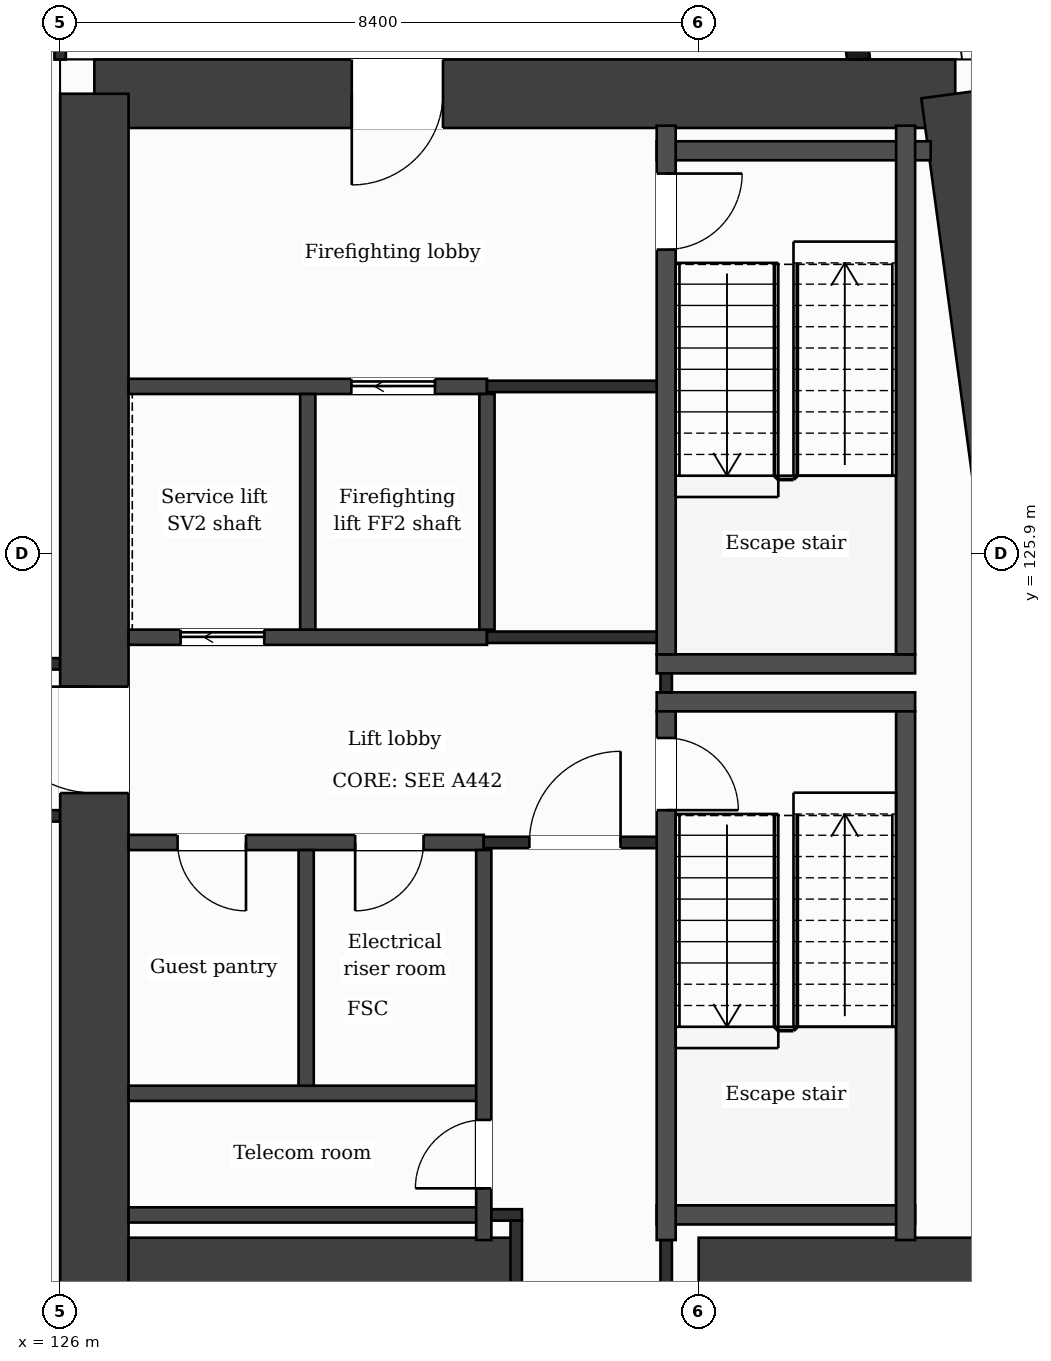
"""IFC4 building model, lengths in metres.
Left out: names, types, materials, properties, quantities, classifications, styles, units other than length and angle.
Written with IfcOpenShell. Run it as: python <this file> out.ifc"""

import sys

from ifc_helpers import new_model, si_unit, direction, frame, frame_2d, origin, place, context, subcontext, project, spatial, rectangle, extrude, element, fill, save


model = new_model("IFC4")
c1 = context("Model", 3, precision=1e-05, world=origin(), true_north=direction((0.0, 1.0)))
c2 = subcontext(c1, "Body", "Model", "MODEL_VIEW")
j1 = project(units=[si_unit("LENGTHUNIT", "METRE"), si_unit("PLANEANGLEUNIT", "RADIAN")], contexts=[c1])
p1 = place(None, origin())
s1 = spatial("IfcSite", under=j1, at=p1, CompositionType="ELEMENT")
p2 = place(p1, origin())
s2 = spatial("IfcBuilding", under=s1, at=p2, CompositionType="ELEMENT")
p3 = place(p2, frame((0.0, 0.0, 173.7)))
s3 = spatial("IfcBuildingStorey", under=s2, at=p3, CompositionType="ELEMENT", Elevation=173.7)
p4 = place(p3, frame((126.45, 131.95, 0.0), z_axis=(0.0, 0.0, 1.0), x_axis=(1.0, 0.0, 0.0)))
e1 = element("IfcWall", 1, at=p4, inside=s3, PredefinedType="SHEAR", context=c2, shape_type="SweptSolid", body=[
    extrude(rectangle(XDim=11.326, YDim=0.9, at=frame_2d((5.663, 0.0))), origin(), (0.0, 0.0, 1.0), 3.7),
])
p5 = place(p4, frame((3.386, 0.0, 0.0)))
e2 = element("IfcOpeningElement", 2, at=p5, cuts=e1, PredefinedType="OPENING", context=c2, shape_type="SweptSolid", body=[
    extrude(rectangle(XDim=1.2, YDim=2.1, at=frame_2d((0.6, 1.05))), frame((0.0, 0.46, 0.0), z_axis=(0.0, -1.0, 0.0), x_axis=(1.0, 0.0, 0.0)), (0.0, 0.0, 1.0), 0.92),
])
p6 = place(p3, frame((137.776, 131.95, 0.0), z_axis=(0.0, 0.0, 1.0), x_axis=(0.133421759112, -0.991059349482, 0.0)))
e3 = element("IfcWall", 3, at=p6, inside=s3, PredefinedType="SHEAR", context=c2, shape_type="SweptSolid", body=[
    extrude(rectangle(XDim=21.29, YDim=0.9, at=frame_2d((10.645, 0.0))), origin(), (0.0, 0.0, 1.0), 3.7),
])
p7 = place(p3, frame((126.45, 110.85, 0.0), z_axis=(0.0, 0.0, 1.0), x_axis=(0.0, 1.0, 0.0)))
e4 = element("IfcWall", 4, at=p7, inside=s3, PredefinedType="SHEAR", context=c2, shape_type="SweptSolid", body=[
    extrude(rectangle(XDim=21.1, YDim=0.9, at=frame_2d((10.55, 0.0))), origin(), (0.0, 0.0, 1.0), 3.7),
])
p8 = place(p7, frame((11.9, 0.0, 0.0)))
e5 = element("IfcOpeningElement", 5, at=p8, cuts=e4, PredefinedType="OPENING", context=c2, shape_type="SweptSolid", body=[
    extrude(rectangle(XDim=1.4, YDim=2.1, at=frame_2d((0.7, 1.05))), frame((0.0, 0.46, 0.0), z_axis=(0.0, -1.0, 0.0), x_axis=(1.0, 0.0, 0.0)), (0.0, 0.0, 1.0), 0.92),
])
p9 = place(p3, frame((126.9, 116.45, 0.0), z_axis=(0.0, 0.0, 1.0), x_axis=(1.0, 0.0, 0.0)))
e6 = element("IfcWall", 6, at=p9, inside=s3, PredefinedType="SHEAR", context=c2, shape_type="SweptSolid", body=[
    extrude(rectangle(XDim=5.1, YDim=0.9, at=frame_2d((2.55, 0.0))), origin(), (0.0, 0.0, 1.0), 3.7),
])
p10 = place(p3, frame((134.4, 116.45, 0.0), z_axis=(0.0, 0.0, 1.0), x_axis=(1.0, 0.0, 0.0)))
e7 = element("IfcWall", 7, at=p10, inside=s3, PredefinedType="SHEAR", context=c2, shape_type="SweptSolid", body=[
    extrude(rectangle(XDim=5.077, YDim=0.9, at=frame_2d((2.539, 0.0))), origin(), (0.0, 0.0, 1.0), 3.7),
])
p11 = place(p3, frame((136.504, 132.4, 0.0), z_axis=(0.0, 0.0, 1.0), x_axis=(-0.133399697462, 0.99106231929, 0.0)))
e8 = element("IfcWall", 8, at=p11, inside=s3, PredefinedType="SOLIDWALL", context=c2, shape_type="SweptSolid", body=[
    extrude(rectangle(XDim=6.74, YDim=0.3, at=frame_2d((3.37, 0.0))), origin(), (0.0, 0.0, 1.0), 3.38),
])
p12 = place(p11, frame((1.115, 0.0, 0.0)))
e9 = element("IfcOpeningElement", 9, at=p12, cuts=e8, PredefinedType="OPENING", context=c2, shape_type="SweptSolid", body=[
    extrude(rectangle(XDim=1.2, YDim=2.4, at=frame_2d((0.6, 1.2))), frame((0.0, 0.16, 0.0), z_axis=(0.0, -1.0, 0.0), x_axis=(1.0, 0.0, 0.0)), (0.0, 0.0, 1.0), 0.32),
])
p13 = place(p11, frame((4.436, 0.0, 0.9)))
e10 = element("IfcOpeningElement", 10, at=p13, cuts=e8, PredefinedType="OPENING", context=c2, shape_type="SweptSolid", body=[
    extrude(rectangle(XDim=1.2, YDim=2.1, at=frame_2d((0.6, 1.05))), frame((0.0, 0.16, 0.0), z_axis=(0.0, -1.0, 0.0), x_axis=(1.0, 0.0, 0.0)), (0.0, 0.0, 1.0), 0.32),
])
p14 = place(p3, frame((126.9, 117.2, 0.0), z_axis=(0.0, 0.0, 1.0), x_axis=(1.0, 0.0, 0.0)))
e11 = element("IfcWall", 11, at=p14, inside=s3, PredefinedType="PARTITIONING", context=c2, shape_type="SweptSolid", body=[
    extrude(rectangle(XDim=4.673, YDim=0.2, at=frame_2d((2.336, 0.0))), origin(), (0.0, 0.0, 1.0), 3.38),
])
p15 = place(p3, frame((131.573, 117.2, 0.0), z_axis=(0.0, 0.0, 1.0), x_axis=(1.0, 0.0, 0.0)))
e12 = element("IfcWall", 12, at=p15, inside=s3, PredefinedType="PARTITIONING", context=c2, shape_type="SweptSolid", body=[
    extrude(rectangle(XDim=0.502, YDim=0.15, at=frame_2d((0.251, 0.0))), origin(), (0.0, 0.0, 1.0), 3.38),
])
p16 = place(p3, frame((133.848, 117.2, 0.0), z_axis=(0.0, 0.0, 1.0), x_axis=(1.0, 0.0, 0.0)))
e13 = element("IfcWall", 13, at=p16, inside=s3, PredefinedType="PARTITIONING", context=c2, shape_type="SweptSolid", body=[
    extrude(rectangle(XDim=3.4, YDim=0.25, at=frame_2d((1.7, 0.0))), origin(), (0.0, 0.0, 1.0), 3.38),
])
p17 = place(p3, frame((126.9, 118.8, 0.0), z_axis=(0.0, 0.0, 1.0), x_axis=(1.0, 0.0, 0.0)))
e14 = element("IfcWall", 14, at=p17, inside=s3, PredefinedType="PARTITIONING", context=c2, shape_type="SweptSolid", body=[
    extrude(rectangle(XDim=4.673, YDim=0.2, at=frame_2d((2.336, 0.0))), origin(), (0.0, 0.0, 1.0), 3.38),
])
p18 = place(p3, frame((126.9, 122.1, 0.0), z_axis=(0.0, 0.0, 1.0), x_axis=(1.0, 0.0, 0.0)))
e15 = element("IfcWall", 15, at=p18, inside=s3, PredefinedType="PARTITIONING", context=c2, shape_type="SweptSolid", body=[
    extrude(rectangle(XDim=4.673, YDim=0.2, at=frame_2d((2.336, 0.0))), origin(), (0.0, 0.0, 1.0), 3.38),
])
p19 = place(p18, frame((2.981, 0.0, 0.0)))
e16 = element("IfcOpeningElement", 16, at=p19, cuts=e15, PredefinedType="OPENING", context=c2, shape_type="SweptSolid", body=[
    extrude(rectangle(XDim=0.9, YDim=2.1, at=frame_2d((0.45, 1.05))), frame((0.0, 0.11, 0.0), z_axis=(0.0, -1.0, 0.0), x_axis=(1.0, 0.0, 0.0)), (0.0, 0.0, 1.0), 0.22),
])
p20 = place(p18, frame((0.645, 0.0, 0.0)))
e17 = element("IfcOpeningElement", 17, at=p20, cuts=e15, PredefinedType="OPENING", context=c2, shape_type="SweptSolid", body=[
    extrude(rectangle(XDim=0.9, YDim=2.1, at=frame_2d((0.45, 1.05))), frame((0.0, 0.11, 0.0), z_axis=(0.0, -1.0, 0.0), x_axis=(1.0, 0.0, 0.0)), (0.0, 0.0, 1.0), 0.22),
])
p21 = place(p3, frame((131.573, 122.1, 0.0), z_axis=(0.0, 0.0, 1.0), x_axis=(1.0, 0.0, 0.0)))
e18 = element("IfcWall", 18, at=p21, inside=s3, PredefinedType="PARTITIONING", context=c2, shape_type="SweptSolid", body=[
    extrude(rectangle(XDim=2.4, YDim=0.15, at=frame_2d((1.2, 0.0))), origin(), (0.0, 0.0, 1.0), 3.38),
])
p22 = place(p21, frame((0.6, 0.0, 0.0)))
e19 = element("IfcOpeningElement", 19, at=p22, cuts=e18, PredefinedType="OPENING", context=c2, shape_type="SweptSolid", body=[
    extrude(rectangle(XDim=1.2, YDim=2.1, at=frame_2d((0.6, 1.05))), frame((0.0, 0.085, 0.0), z_axis=(0.0, -1.0, 0.0), x_axis=(1.0, 0.0, 0.0)), (0.0, 0.0, 1.0), 0.17),
])
p23 = place(p3, frame((100.8, 122.45, 0.0), z_axis=(0.0, 0.0, 1.0), x_axis=(1.0, 0.0, 0.0)))
e20 = element("IfcWall", 20, at=p23, inside=s3, PredefinedType="PARTITIONING", context=c2, shape_type="SweptSolid", body=[
    extrude(rectangle(XDim=25.2, YDim=0.15, at=frame_2d((12.6, 0.0))), origin(), (0.0, 0.0, 1.0), 3.38),
])
for number, where, z_axis, x_axis in (
    (21, (133.848, 123.95, 0.0), (0.0, 0.0, 1.0), (1.0, 0.0, 0.0)),
    (22, (133.848, 124.45, 0.0), (0.0, 0.0, 1.0), (1.0, 0.0, 0.0)),
):
    element("IfcWall", number, at=place(p3, frame(where, z_axis=z_axis, x_axis=x_axis)), inside=s3, PredefinedType="PARTITIONING", context=c2, shape_type="SweptSolid", body=[
        extrude(rectangle(XDim=3.4, YDim=0.25, at=frame_2d((1.7, 0.0))), origin(), (0.0, 0.0, 1.0), 3.38),
    ])
p24 = place(p3, frame((100.8, 124.45, 0.0), z_axis=(0.0, 0.0, 1.0), x_axis=(1.0, 0.0, 0.0)))
e23 = element("IfcWall", 23, at=p24, inside=s3, PredefinedType="PARTITIONING", context=c2, shape_type="SweptSolid", body=[
    extrude(rectangle(XDim=25.2, YDim=0.15, at=frame_2d((12.6, 0.0))), origin(), (0.0, 0.0, 1.0), 3.38),
])
p25 = place(p24, frame((0.975, 0.0, 0.0)))
e24 = element("IfcOpeningElement", 24, at=p25, cuts=e23, PredefinedType="OPENING", context=c2, shape_type="SweptSolid", body=[
    extrude(rectangle(XDim=1.0, YDim=2.1, at=frame_2d((0.5, 1.05))), frame((0.0, 0.085, 0.0), z_axis=(0.0, -1.0, 0.0), x_axis=(1.0, 0.0, 0.0)), (0.0, 0.0, 1.0), 0.17),
])
p26 = place(p24, frame((6.05, 0.0, 0.0)))
e25 = element("IfcOpeningElement", 25, at=p26, cuts=e23, PredefinedType="OPENING", context=c2, shape_type="SweptSolid", body=[
    extrude(rectangle(XDim=1.0, YDim=2.1, at=frame_2d((0.5, 1.05))), frame((0.0, 0.085, 0.0), z_axis=(0.0, -1.0, 0.0), x_axis=(1.0, 0.0, 0.0)), (0.0, 0.0, 1.0), 0.17),
])
p27 = place(p24, frame((9.27, 0.0, 0.0)))
e26 = element("IfcOpeningElement", 26, at=p27, cuts=e23, PredefinedType="OPENING", context=c2, shape_type="SweptSolid", body=[
    extrude(rectangle(XDim=1.0, YDim=2.1, at=frame_2d((0.5, 1.05))), frame((0.0, 0.085, 0.0), z_axis=(0.0, -1.0, 0.0), x_axis=(1.0, 0.0, 0.0)), (0.0, 0.0, 1.0), 0.17),
])
p28 = place(p24, frame((14.2, 0.0, 0.0)))
e27 = element("IfcOpeningElement", 27, at=p28, cuts=e23, PredefinedType="OPENING", context=c2, shape_type="SweptSolid", body=[
    extrude(rectangle(XDim=1.0, YDim=2.1, at=frame_2d((0.5, 1.05))), frame((0.0, 0.085, 0.0), z_axis=(0.0, -1.0, 0.0), x_axis=(1.0, 0.0, 0.0)), (0.0, 0.0, 1.0), 0.17),
])
p29 = place(p24, frame((18.825, 0.0, 0.0)))
e28 = element("IfcOpeningElement", 28, at=p29, cuts=e23, PredefinedType="OPENING", context=c2, shape_type="SweptSolid", body=[
    extrude(rectangle(XDim=1.0, YDim=2.1, at=frame_2d((0.5, 1.05))), frame((0.0, 0.085, 0.0), z_axis=(0.0, -1.0, 0.0), x_axis=(1.0, 0.0, 0.0)), (0.0, 0.0, 1.0), 0.17),
])
p30 = place(p3, frame((126.9, 124.8, 0.0), z_axis=(0.0, 0.0, 1.0), x_axis=(1.0, 0.0, 0.0)))
e29 = element("IfcWall", 29, at=p30, inside=s3, PredefinedType="PARTITIONING", context=c2, shape_type="SweptSolid", body=[
    extrude(rectangle(XDim=4.715, YDim=0.2, at=frame_2d((2.358, 0.0))), origin(), (0.0, 0.0, 1.0), 3.38),
])
p31 = place(p30, frame((0.685, 0.0, 0.0)))
e30 = element("IfcOpeningElement", 30, at=p31, cuts=e29, PredefinedType="OPENING", context=c2, shape_type="SweptSolid", body=[
    extrude(rectangle(XDim=1.1, YDim=2.1, at=frame_2d((0.55, 1.05))), frame((0.0, 0.11, 0.0), z_axis=(0.0, -1.0, 0.0), x_axis=(1.0, 0.0, 0.0)), (0.0, 0.0, 1.0), 0.22),
])
p32 = place(p3, frame((131.615, 124.8, 0.0), z_axis=(0.0, 0.0, 1.0), x_axis=(1.0, 0.0, 0.0)))
e31 = element("IfcWall", 31, at=p32, inside=s3, PredefinedType="PARTITIONING", context=c2, shape_type="SweptSolid", body=[
    extrude(rectangle(XDim=2.483, YDim=0.15, at=frame_2d((1.241, 0.0))), origin(), (0.0, 0.0, 1.0), 3.38),
])
p33 = place(p3, frame((126.9, 128.1, 0.0), z_axis=(0.0, 0.0, 1.0), x_axis=(1.0, 0.0, 0.0)))
e32 = element("IfcWall", 32, at=p33, inside=s3, PredefinedType="PARTITIONING", context=c2, shape_type="SweptSolid", body=[
    extrude(rectangle(XDim=4.715, YDim=0.2, at=frame_2d((2.358, 0.0))), origin(), (0.0, 0.0, 1.0), 3.38),
])
p34 = place(p33, frame((2.931, 0.0, 0.0)))
e33 = element("IfcOpeningElement", 33, at=p34, cuts=e32, PredefinedType="OPENING", context=c2, shape_type="SweptSolid", body=[
    extrude(rectangle(XDim=1.1, YDim=2.1, at=frame_2d((0.55, 1.05))), frame((0.0, 0.11, 0.0), z_axis=(0.0, -1.0, 0.0), x_axis=(1.0, 0.0, 0.0)), (0.0, 0.0, 1.0), 0.22),
])
p35 = place(p3, frame((131.615, 128.1, 0.0), z_axis=(0.0, 0.0, 1.0), x_axis=(1.0, 0.0, 0.0)))
e34 = element("IfcWall", 34, at=p35, inside=s3, PredefinedType="PARTITIONING", context=c2, shape_type="SweptSolid", body=[
    extrude(rectangle(XDim=2.358, YDim=0.15, at=frame_2d((1.179, 0.0))), origin(), (0.0, 0.0, 1.0), 3.38),
])
p36 = place(p3, frame((133.848, 131.2, 0.0), z_axis=(0.0, 0.0, 1.0), x_axis=(1.0, 0.0, 0.0)))
e35 = element("IfcWall", 35, at=p36, inside=s3, PredefinedType="PARTITIONING", context=c2, shape_type="SweptSolid", body=[
    extrude(rectangle(XDim=3.605, YDim=0.25, at=frame_2d((1.802, 0.0))), origin(), (0.0, 0.0, 1.0), 3.38),
])
p37 = place(p3, frame((126.0, 132.4, 0.0), z_axis=(0.0, 0.0, 1.0), x_axis=(0.0, 1.0, 0.0)))
e36 = element("IfcWall", 36, at=p37, inside=s3, PredefinedType="PARTITIONING", context=c2, shape_type="SweptSolid", body=[
    extrude(rectangle(XDim=1.325, YDim=0.15, at=frame_2d((0.663, 0.0))), origin(), (0.0, 0.0, 1.0), 3.38),
])
for number, where, z_axis, x_axis in (
    (37, (129.237, 118.9, 0.0), (0.0, 0.0, 1.0), (0.0, 1.0, 0.0)),
    (38, (129.258, 124.9, 0.0), (0.0, 0.0, 1.0), (0.0, 1.0, 0.0)),
):
    element("IfcWall", number, at=place(p3, frame(where, z_axis=z_axis, x_axis=x_axis)), inside=s3, PredefinedType="PARTITIONING", context=c2, shape_type="SweptSolid", body=[
        extrude(rectangle(XDim=3.1, YDim=0.2, at=frame_2d((1.55, 0.0))), origin(), (0.0, 0.0, 1.0), 3.38),
    ])
p38 = place(p3, frame((131.573, 116.87, 0.0), z_axis=(0.0, 0.0, 1.0), x_axis=(0.0, 1.0, 0.0)))
e39 = element("IfcWall", 39, at=p38, inside=s3, PredefinedType="PARTITIONING", context=c2, shape_type="SweptSolid", body=[
    extrude(rectangle(XDim=5.13, YDim=0.2, at=frame_2d((2.565, 0.0))), origin(), (0.0, 0.0, 1.0), 3.38),
])
p39 = place(p38, frame((0.68, 0.0, 0.0)))
e40 = element("IfcOpeningElement", 40, at=p39, cuts=e39, PredefinedType="OPENING", context=c2, shape_type="SweptSolid", body=[
    extrude(rectangle(XDim=0.9, YDim=2.1, at=frame_2d((0.45, 1.05))), frame((0.0, 0.11, 0.0), z_axis=(0.0, -1.0, 0.0), x_axis=(1.0, 0.0, 0.0)), (0.0, 0.0, 1.0), 0.22),
])
p40 = place(p3, frame((131.615, 124.9, 0.0), z_axis=(0.0, 0.0, 1.0), x_axis=(0.0, 1.0, 0.0)))
e41 = element("IfcWall", 41, at=p40, inside=s3, PredefinedType="PARTITIONING", context=c2, shape_type="SweptSolid", body=[
    extrude(rectangle(XDim=3.1, YDim=0.2, at=frame_2d((1.55, 0.0))), origin(), (0.0, 0.0, 1.0), 3.38),
])
p41 = place(p3, frame((132.0, 116.0, 0.0), z_axis=(0.0, 0.0, 1.0), x_axis=(0.0, 1.0, 0.0)))
e42 = element("IfcWall", 42, at=p41, inside=s3, PredefinedType="PARTITIONING", context=c2, shape_type="SweptSolid", body=[
    extrude(rectangle(XDim=1.125, YDim=0.15, at=frame_2d((0.562, 0.0))), origin(), (0.0, 0.0, 1.0), 3.38),
])
p42 = place(p3, frame((133.973, 116.0, 0.0), z_axis=(0.0, 0.0, 1.0), x_axis=(0.0, 1.0, 0.0)))
e43 = element("IfcWall", 43, at=p42, inside=s3, PredefinedType="PARTITIONING", context=c2, shape_type="SweptSolid", body=[
    extrude(rectangle(XDim=0.87, YDim=0.15, at=frame_2d((0.435, 0.0))), origin(), (0.0, 0.0, 1.0), 3.38),
])
p43 = place(p3, frame((133.973, 124.075, 0.0), z_axis=(0.0, 0.0, 1.0), x_axis=(0.0, 1.0, 0.0)))
e44 = element("IfcWall", 44, at=p43, inside=s3, PredefinedType="PARTITIONING", context=c2, shape_type="SweptSolid", body=[
    extrude(rectangle(XDim=0.25, YDim=0.15, at=frame_2d((0.125, 0.0))), origin(), (0.0, 0.0, 1.0), 3.38),
])
p44 = place(p3, frame((133.973, 116.87, 0.0), z_axis=(0.0, 0.0, 1.0), x_axis=(0.0, 1.0, 0.0)))
e45 = element("IfcWall", 45, at=p44, inside=s3, PredefinedType="PARTITIONING", context=c2, shape_type="SweptSolid", body=[
    extrude(rectangle(XDim=6.955, YDim=0.25, at=frame_2d((3.478, 0.0))), origin(), (0.0, 0.0, 1.0), 3.38),
])
p45 = place(p44, frame((5.655, 0.0, 0.0)))
e46 = element("IfcOpeningElement", 46, at=p45, cuts=e45, PredefinedType="OPENING", context=c2, shape_type="SweptSolid", body=[
    extrude(rectangle(XDim=0.95, YDim=2.1, at=frame_2d((0.475, 1.05))), frame((0.0, 0.135, 0.0), z_axis=(0.0, -1.0, 0.0), x_axis=(1.0, 0.0, 0.0)), (0.0, 0.0, 1.0), 0.27),
])
p46 = place(p3, frame((133.973, 124.575, 0.0), z_axis=(0.0, 0.0, 1.0), x_axis=(0.0, 1.0, 0.0)))
e47 = element("IfcWall", 47, at=p46, inside=s3, PredefinedType="PARTITIONING", context=c2, shape_type="SweptSolid", body=[
    extrude(rectangle(XDim=6.955, YDim=0.25, at=frame_2d((3.478, 0.0))), origin(), (0.0, 0.0, 1.0), 3.38),
])
p47 = place(p46, frame((5.325, 0.0, 0.0)))
e48 = element("IfcOpeningElement", 48, at=p47, cuts=e47, PredefinedType="OPENING", context=c2, shape_type="SweptSolid", body=[
    extrude(rectangle(XDim=1.0, YDim=2.1, at=frame_2d((0.5, 1.05))), frame((0.0, 0.135, 0.0), z_axis=(0.0, -1.0, 0.0), x_axis=(1.0, 0.0, 0.0)), (0.0, 0.0, 1.0), 0.27),
])
p48 = place(p3, frame((137.123, 116.87, 0.0), z_axis=(0.0, 0.0, 1.0), x_axis=(0.0, 1.0, 0.0)))
e49 = element("IfcWall", 49, at=p48, inside=s3, PredefinedType="PARTITIONING", context=c2, shape_type="SweptSolid", body=[
    extrude(rectangle(XDim=6.955, YDim=0.25, at=frame_2d((3.478, 0.0))), origin(), (0.0, 0.0, 1.0), 3.38),
])
p49 = place(p3, frame((137.123, 124.575, 0.0), z_axis=(0.0, 0.0, 1.0), x_axis=(0.0, 1.0, 0.0)))
e50 = element("IfcWall", 50, at=p49, inside=s3, PredefinedType="PARTITIONING", context=c2, shape_type="SweptSolid", body=[
    extrude(rectangle(XDim=6.955, YDim=0.25, at=frame_2d((3.478, 0.0))), origin(), (0.0, 0.0, 1.0), 3.38),
])
p50 = place(p22, origin())
e51 = element("IfcDoor", 51, at=p50, inside=s3, OperationType="SINGLE_SWING_RIGHT", PredefinedType="DOOR", context=c2, shape_type="SweptSolid", body=[
    extrude(rectangle(XDim=1.2, YDim=2.1, at=frame_2d((0.6, 1.05))), frame((0.0, 0.025, 0.0), z_axis=(0.0, -1.0, 0.0), x_axis=(1.0, 0.0, 0.0)), (0.0, 0.0, 1.0), 0.05),
])
fill(e19, e51)
p51 = place(p34, origin())
e52 = element("IfcDoor", 52, at=p51, inside=s3, OperationType="SLIDING_TO_LEFT", PredefinedType="DOOR", context=c2, shape_type="SweptSolid", body=[
    extrude(rectangle(XDim=1.1, YDim=2.1, at=frame_2d((0.55, 1.05))), frame((0.0, 0.025, 0.0), z_axis=(0.0, -1.0, 0.0), x_axis=(1.0, 0.0, 0.0)), (0.0, 0.0, 1.0), 0.05),
])
fill(e33, e52)
p52 = place(p31, origin())
e53 = element("IfcDoor", 53, at=p52, inside=s3, OperationType="SLIDING_TO_LEFT", PredefinedType="DOOR", context=c2, shape_type="SweptSolid", body=[
    extrude(rectangle(XDim=1.1, YDim=2.1, at=frame_2d((0.55, 1.05))), frame((0.0, 0.025, 0.0), z_axis=(0.0, -1.0, 0.0), x_axis=(1.0, 0.0, 0.0)), (0.0, 0.0, 1.0), 0.05),
])
fill(e30, e53)
p53 = place(p19, origin())
e54 = element("IfcDoor", 54, at=p53, inside=s3, OperationType="SINGLE_SWING_LEFT", PredefinedType="DOOR", context=c2, shape_type="SweptSolid", body=[
    extrude(rectangle(XDim=0.9, YDim=2.1, at=frame_2d((0.45, 1.05))), frame((0.0, 0.025, 0.0), z_axis=(0.0, -1.0, 0.0), x_axis=(1.0, 0.0, 0.0)), (0.0, 0.0, 1.0), 0.05),
])
fill(e16, e54)
p54 = place(p20, origin())
e55 = element("IfcDoor", 55, at=p54, inside=s3, OperationType="SINGLE_SWING_RIGHT", PredefinedType="DOOR", context=c2, shape_type="SweptSolid", body=[
    extrude(rectangle(XDim=0.9, YDim=2.1, at=frame_2d((0.45, 1.05))), frame((0.0, 0.025, 0.0), z_axis=(0.0, -1.0, 0.0), x_axis=(1.0, 0.0, 0.0)), (0.0, 0.0, 1.0), 0.05),
])
fill(e17, e55)
p55 = place(p45, origin())
e56 = element("IfcDoor", 56, at=p55, inside=s3, OperationType="SINGLE_SWING_LEFT", PredefinedType="DOOR", context=c2, shape_type="SweptSolid", body=[
    extrude(rectangle(XDim=0.95, YDim=2.1, at=frame_2d((0.475, 1.05))), frame((0.0, 0.025, 0.0), z_axis=(0.0, -1.0, 0.0), x_axis=(1.0, 0.0, 0.0)), (0.0, 0.0, 1.0), 0.05),
])
fill(e46, e56)
p56 = place(p47, origin())
e57 = element("IfcDoor", 57, at=p56, inside=s3, OperationType="SINGLE_SWING_RIGHT", PredefinedType="DOOR", context=c2, shape_type="SweptSolid", body=[
    extrude(rectangle(XDim=1.0, YDim=2.1, at=frame_2d((0.5, 1.05))), frame((0.0, 0.025, 0.0), z_axis=(0.0, -1.0, 0.0), x_axis=(1.0, 0.0, 0.0)), (0.0, 0.0, 1.0), 0.05),
])
fill(e48, e57)
p57 = place(p39, origin())
e58 = element("IfcDoor", 58, at=p57, inside=s3, OperationType="SINGLE_SWING_LEFT", PredefinedType="DOOR", context=c2, shape_type="SweptSolid", body=[
    extrude(rectangle(XDim=0.9, YDim=2.1, at=frame_2d((0.45, 1.05))), frame((0.0, 0.025, 0.0), z_axis=(0.0, -1.0, 0.0), x_axis=(1.0, 0.0, 0.0)), (0.0, 0.0, 1.0), 0.05),
])
fill(e40, e58)
p58 = place(p5, origin())
e59 = element("IfcDoor", 59, at=p58, inside=s3, OperationType="SINGLE_SWING_LEFT", PredefinedType="DOOR", context=c2, shape_type="SweptSolid", body=[
    extrude(rectangle(XDim=1.2, YDim=2.1, at=frame_2d((0.6, 1.05))), frame((0.0, 0.025, 0.0), z_axis=(0.0, -1.0, 0.0), x_axis=(1.0, 0.0, 0.0)), (0.0, 0.0, 1.0), 0.05),
])
fill(e2, e59)
p59 = place(p8, origin())
e60 = element("IfcDoor", 60, at=p59, inside=s3, OperationType="SINGLE_SWING_RIGHT", PredefinedType="DOOR", context=c2, shape_type="SweptSolid", body=[
    extrude(rectangle(XDim=1.4, YDim=2.1, at=frame_2d((0.7, 1.05))), frame((0.0, 0.025, 0.0), z_axis=(0.0, -1.0, 0.0), x_axis=(1.0, 0.0, 0.0)), (0.0, 0.0, 1.0), 0.05),
])
fill(e5, e60)
save(model, sys.argv[1])
